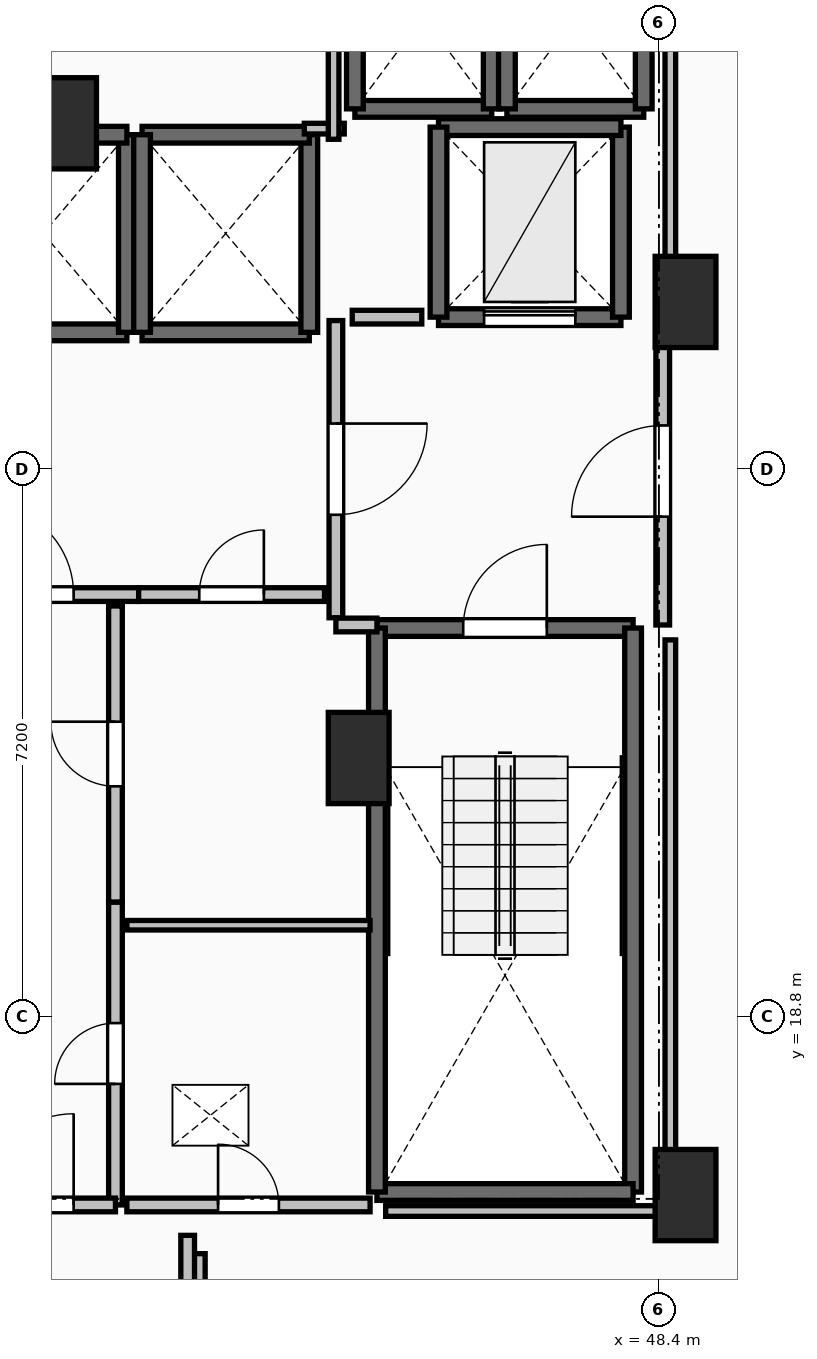
"""IFC4 building model, lengths in metres.
Left out: names, types, materials, properties, quantities, classifications, styles, units other than length and angle.
Written with IfcOpenShell. Run it as: python <this file> out.ifc"""

import sys

from ifc_helpers import new_model, si_unit, direction, frame, frame_2d, origin, origin_2d, place, context, subcontext, project, spatial, rectangle, extrude, element, fill, save


model = new_model("IFC4")
c1 = context("Model", 3, precision=1e-05, world=origin(), true_north=direction((0.0, 1.0)))
c2 = subcontext(c1, "Body", "Model", "MODEL_VIEW")
j1 = project(units=[si_unit("LENGTHUNIT", "METRE"), si_unit("PLANEANGLEUNIT", "RADIAN")], contexts=[c1])
p1 = place(None, origin())
s1 = spatial("IfcSite", under=j1, at=p1, CompositionType="ELEMENT")
p2 = place(p1, origin())
s2 = spatial("IfcBuilding", under=s1, at=p2, CompositionType="ELEMENT")
p3 = place(p2, frame((0.0, 0.0, 52.0)))
s3 = spatial("IfcBuildingStorey", under=s2, at=p3, CompositionType="ELEMENT", Elevation=52.0)
for number, where, z_axis, x_axis in (
    (1, (48.75, 28.2, 0.0), (0.0, 0.0, 1.0), (1.0, 0.0, 0.0)),
    (2, (48.75, 16.45, 0.0), (0.0, 0.0, 1.0), (1.0, 0.0, 0.0)),
    (3, (44.45, 22.2, 0.0), (0.0, 0.0, 1.0), (1.0, 0.0, 0.0)),
    (4, (40.6, 30.55, 0.0), (0.0, 0.0, 1.0), (1.0, 0.0, 0.0)),
):
    element("IfcColumn", number, at=place(p3, frame(where, z_axis=z_axis, x_axis=x_axis)), inside=s3, PredefinedType="PILASTER", context=c2, shape_type="SweptSolid", body=[
        extrude(rectangle(XDim=0.8, YDim=1.2, at=origin_2d()), origin(), (0.0, 0.0, 1.0), 3.5),
    ])
p4 = place(p3, frame((44.69, 23.91, 0.0), z_axis=(0.0, 0.0, 1.0), x_axis=(1.0, 0.0, 0.0)))
e5 = element("IfcWall", 5, at=p4, inside=s3, PredefinedType="SOLIDWALL", context=c2, shape_type="SweptSolid", body=[
    extrude(rectangle(XDim=3.37, YDim=0.22, at=frame_2d((1.685, 0.0))), origin(), (0.0, 0.0, 1.0), 3.24),
])
p5 = place(p4, frame((1.135, 0.0, 0.0)))
e6 = element("IfcOpeningElement", 6, at=p5, cuts=e5, PredefinedType="OPENING", context=c2, shape_type="SweptSolid", body=[
    extrude(rectangle(XDim=1.1, YDim=2.15, at=frame_2d((0.55, 1.075))), frame((0.0, 0.125, 0.0), z_axis=(0.0, -1.0, 0.0), x_axis=(1.0, 0.0, 0.0)), (0.0, 0.0, 1.0), 0.25),
])
p6 = place(p3, frame((48.06, 23.91, 0.0), z_axis=(0.0, 0.0, 1.0), x_axis=(0.0, -1.0, 0.0)))
e7 = element("IfcWall", 7, at=p6, inside=s3, PredefinedType="SOLIDWALL", context=c2, shape_type="SweptSolid", body=[
    extrude(rectangle(XDim=7.42, YDim=0.22, at=frame_2d((3.71, 0.0))), origin(), (0.0, 0.0, 1.0), 3.24),
])
p7 = place(p3, frame((48.06, 16.49, 0.0), z_axis=(0.0, 0.0, 1.0), x_axis=(-1.0, 0.0, 0.0)))
e8 = element("IfcWall", 8, at=p7, inside=s3, PredefinedType="SOLIDWALL", context=c2, shape_type="SweptSolid", body=[
    extrude(rectangle(XDim=3.37, YDim=0.22, at=frame_2d((1.685, 0.0))), origin(), (0.0, 0.0, 1.0), 3.24),
])
p8 = place(p3, frame((44.69, 16.49, 0.0), z_axis=(0.0, 0.0, 1.0), x_axis=(0.0, 1.0, 0.0)))
e9 = element("IfcWall", 9, at=p8, inside=s3, PredefinedType="SOLIDWALL", context=c2, shape_type="SweptSolid", body=[
    extrude(rectangle(XDim=7.42, YDim=0.22, at=frame_2d((3.71, 0.0))), origin(), (0.0, 0.0, 1.0), 3.24),
])
p9 = place(p3, frame((39.2, 27.8, 0.0), z_axis=(0.0, 0.0, 1.0), x_axis=(1.0, 0.0, 0.0)))
e10 = element("IfcWall", 10, at=p9, inside=s3, PredefinedType="SOLIDWALL", context=c2, shape_type="SweptSolid", body=[
    extrude(rectangle(XDim=2.2, YDim=0.22, at=frame_2d((1.1, 0.0))), origin(), (0.0, 0.0, 1.0), 3.24),
])
p10 = place(p3, frame((41.4, 27.8, 0.0), z_axis=(0.0, 0.0, 1.0), x_axis=(0.0, 1.0, 0.0)))
e11 = element("IfcWall", 11, at=p10, inside=s3, PredefinedType="SOLIDWALL", context=c2, shape_type="SweptSolid", body=[
    extrude(rectangle(XDim=2.6, YDim=0.22, at=frame_2d((1.3, 0.0))), origin(), (0.0, 0.0, 1.0), 3.24),
])
for number, where, z_axis, x_axis in (
    (12, (41.4, 30.4, 0.0), (0.0, 0.0, 1.0), (-1.0, 0.0, 0.0)),
    (13, (41.6, 27.8, 0.0), (0.0, 0.0, 1.0), (1.0, 0.0, 0.0)),
):
    element("IfcWall", number, at=place(p3, frame(where, z_axis=z_axis, x_axis=x_axis)), inside=s3, PredefinedType="SOLIDWALL", context=c2, shape_type="SweptSolid", body=[
        extrude(rectangle(XDim=2.2, YDim=0.22, at=frame_2d((1.1, 0.0))), origin(), (0.0, 0.0, 1.0), 3.24),
    ])
p11 = place(p3, frame((43.8, 27.8, 0.0), z_axis=(0.0, 0.0, 1.0), x_axis=(0.0, 1.0, 0.0)))
e14 = element("IfcWall", 14, at=p11, inside=s3, PredefinedType="SOLIDWALL", context=c2, shape_type="SweptSolid", body=[
    extrude(rectangle(XDim=2.6, YDim=0.22, at=frame_2d((1.3, 0.0))), origin(), (0.0, 0.0, 1.0), 3.24),
])
p12 = place(p3, frame((43.8, 30.4, 0.0), z_axis=(0.0, 0.0, 1.0), x_axis=(-1.0, 0.0, 0.0)))
e15 = element("IfcWall", 15, at=p12, inside=s3, PredefinedType="SOLIDWALL", context=c2, shape_type="SweptSolid", body=[
    extrude(rectangle(XDim=2.2, YDim=0.22, at=frame_2d((1.1, 0.0))), origin(), (0.0, 0.0, 1.0), 3.24),
])
p13 = place(p3, frame((41.6, 30.4, 0.0), z_axis=(0.0, 0.0, 1.0), x_axis=(0.0, -1.0, 0.0)))
e16 = element("IfcWall", 16, at=p13, inside=s3, PredefinedType="SOLIDWALL", context=c2, shape_type="SweptSolid", body=[
    extrude(rectangle(XDim=2.6, YDim=0.22, at=frame_2d((1.3, 0.0))), origin(), (0.0, 0.0, 1.0), 3.24),
])
p14 = place(p3, frame((44.4, 30.74, 0.0), z_axis=(0.0, 0.0, 1.0), x_axis=(1.0, 0.0, 0.0)))
e17 = element("IfcWall", 17, at=p14, inside=s3, PredefinedType="SOLIDWALL", context=c2, shape_type="SweptSolid", body=[
    extrude(rectangle(XDim=1.8, YDim=0.22, at=frame_2d((0.9, 0.0))), origin(), (0.0, 0.0, 1.0), 3.24),
])
for number, where, z_axis, x_axis in (
    (18, (46.2, 30.74, 0.0), (0.0, 0.0, 1.0), (0.0, 1.0, 0.0)),
    (19, (44.4, 33.16, 0.0), (0.0, 0.0, 1.0), (0.0, -1.0, 0.0)),
):
    element("IfcWall", number, at=place(p3, frame(where, z_axis=z_axis, x_axis=x_axis)), inside=s3, PredefinedType="SOLIDWALL", context=c2, shape_type="SweptSolid", body=[
        extrude(rectangle(XDim=2.42, YDim=0.22, at=frame_2d((1.21, 0.0))), origin(), (0.0, 0.0, 1.0), 3.24),
    ])
p15 = place(p3, frame((46.4, 30.74, 0.0), z_axis=(0.0, 0.0, 1.0), x_axis=(1.0, 0.0, 0.0)))
e20 = element("IfcWall", 20, at=p15, inside=s3, PredefinedType="SOLIDWALL", context=c2, shape_type="SweptSolid", body=[
    extrude(rectangle(XDim=1.8, YDim=0.22, at=frame_2d((0.9, 0.0))), origin(), (0.0, 0.0, 1.0), 3.24),
])
for number, where, z_axis, x_axis in (
    (21, (48.2, 30.74, 0.0), (0.0, 0.0, 1.0), (0.0, 1.0, 0.0)),
    (22, (46.4, 33.16, 0.0), (0.0, 0.0, 1.0), (0.0, -1.0, 0.0)),
):
    element("IfcWall", number, at=place(p3, frame(where, z_axis=z_axis, x_axis=x_axis)), inside=s3, PredefinedType="SOLIDWALL", context=c2, shape_type="SweptSolid", body=[
        extrude(rectangle(XDim=2.42, YDim=0.22, at=frame_2d((1.21, 0.0))), origin(), (0.0, 0.0, 1.0), 3.24),
    ])
p16 = place(p3, frame((45.5, 28.0, 0.0), z_axis=(0.0, 0.0, 1.0), x_axis=(1.0, 0.0, 0.0)))
e23 = element("IfcWall", 23, at=p16, inside=s3, PredefinedType="SHEAR", context=c2, shape_type="SweptSolid", body=[
    extrude(rectangle(XDim=2.4, YDim=0.22, at=frame_2d((1.2, 0.0))), origin(), (0.0, 0.0, 1.0), 3.24),
])
p17 = place(p16, frame((0.6, 0.0, 0.0)))
e24 = element("IfcOpeningElement", 24, at=p17, cuts=e23, PredefinedType="OPENING", context=c2, shape_type="SweptSolid", body=[
    extrude(rectangle(XDim=1.2, YDim=2.2, at=frame_2d((0.6, 1.1))), frame((0.0, 0.125, 0.0), z_axis=(0.0, -1.0, 0.0), x_axis=(1.0, 0.0, 0.0)), (0.0, 0.0, 1.0), 0.25),
])
p18 = place(p3, frame((47.9, 28.0, 0.0), z_axis=(0.0, 0.0, 1.0), x_axis=(0.0, 1.0, 0.0)))
e25 = element("IfcWall", 25, at=p18, inside=s3, PredefinedType="SHEAR", context=c2, shape_type="SweptSolid", body=[
    extrude(rectangle(XDim=2.5, YDim=0.22, at=frame_2d((1.25, 0.0))), origin(), (0.0, 0.0, 1.0), 3.24),
])
p19 = place(p3, frame((47.9, 30.5, 0.0), z_axis=(0.0, 0.0, 1.0), x_axis=(-1.0, 0.0, 0.0)))
e26 = element("IfcWall", 26, at=p19, inside=s3, PredefinedType="SHEAR", context=c2, shape_type="SweptSolid", body=[
    extrude(rectangle(XDim=2.4, YDim=0.22, at=frame_2d((1.2, 0.0))), origin(), (0.0, 0.0, 1.0), 3.24),
])
p20 = place(p3, frame((45.5, 30.5, 0.0), z_axis=(0.0, 0.0, 1.0), x_axis=(0.0, -1.0, 0.0)))
e27 = element("IfcWall", 27, at=p20, inside=s3, PredefinedType="SHEAR", context=c2, shape_type="SweptSolid", body=[
    extrude(rectangle(XDim=2.5, YDim=0.22, at=frame_2d((1.25, 0.0))), origin(), (0.0, 0.0, 1.0), 3.24),
])
p21 = place(p3, frame((44.15, 27.955, 0.0), z_axis=(0.0, 0.0, 1.0), x_axis=(0.0, -1.0, 0.0)))
e28 = element("IfcWall", 28, at=p21, inside=s3, PredefinedType="PARTITIONING", context=c2, shape_type="SweptSolid", body=[
    extrude(rectangle(XDim=3.91, YDim=0.18, at=frame_2d((1.955, 0.0))), origin(), (0.0, 0.0, 1.0), 3.24),
])
p22 = place(p21, frame((1.355, 0.0, 0.0)))
e29 = element("IfcOpeningElement", 29, at=p22, cuts=e28, PredefinedType="OPENING", context=c2, shape_type="SweptSolid", body=[
    extrude(rectangle(XDim=1.2, YDim=2.15, at=frame_2d((0.6, 1.075))), frame((0.0, 0.105, 0.0), z_axis=(0.0, -1.0, 0.0), x_axis=(1.0, 0.0, 0.0)), (0.0, 0.0, 1.0), 0.21),
])
p23 = place(p3, frame((44.15, 23.95, 0.0), z_axis=(0.0, 0.0, 1.0), x_axis=(1.0, 0.0, 0.0)))
e30 = element("IfcWall", 30, at=p23, inside=s3, PredefinedType="PARTITIONING", context=c2, shape_type="SweptSolid", body=[
    extrude(rectangle(XDim=0.54, YDim=0.18, at=frame_2d((0.27, 0.0))), origin(), (0.0, 0.0, 1.0), 3.24),
])
p24 = place(p3, frame((48.45, 23.95, 0.0), z_axis=(0.0, 0.0, 1.0), x_axis=(0.0, 1.0, 0.0)))
e31 = element("IfcWall", 31, at=p24, inside=s3, PredefinedType="PARTITIONING", context=c2, shape_type="SweptSolid", body=[
    extrude(rectangle(XDim=4.05, YDim=0.18, at=frame_2d((2.025, 0.0))), origin(), (0.0, 0.0, 1.0), 3.24),
])
p25 = place(p24, frame((1.425, 0.0, 0.0)))
e32 = element("IfcOpeningElement", 32, at=p25, cuts=e31, PredefinedType="OPENING", context=c2, shape_type="SweptSolid", body=[
    extrude(rectangle(XDim=1.2, YDim=2.15, at=frame_2d((0.6, 1.075))), frame((0.0, 0.105, 0.0), z_axis=(0.0, -1.0, 0.0), x_axis=(1.0, 0.0, 0.0)), (0.0, 0.0, 1.0), 0.21),
])
p26 = place(p3, frame((38.645, 24.35, 0.0), z_axis=(0.0, 0.0, 1.0), x_axis=(1.0, 0.0, 0.0)))
e33 = element("IfcWall", 33, at=p26, inside=s3, PredefinedType="PARTITIONING", context=c2, shape_type="SweptSolid", body=[
    extrude(rectangle(XDim=2.91, YDim=0.18, at=frame_2d((1.455, 0.0))), origin(), (0.0, 0.0, 1.0), 3.24),
])
p27 = place(p26, frame((0.855, 0.0, 0.0)))
e34 = element("IfcOpeningElement", 34, at=p27, cuts=e33, PredefinedType="OPENING", context=c2, shape_type="SweptSolid", body=[
    extrude(rectangle(XDim=1.2, YDim=2.15, at=frame_2d((0.6, 1.075))), frame((0.0, 0.105, 0.0), z_axis=(0.0, -1.0, 0.0), x_axis=(1.0, 0.0, 0.0)), (0.0, 0.0, 1.0), 0.21),
])
p28 = place(p3, frame((41.555, 24.35, 0.0), z_axis=(0.0, 0.0, 1.0), x_axis=(1.0, 0.0, 0.0)))
e35 = element("IfcWall", 35, at=p28, inside=s3, PredefinedType="PARTITIONING", context=c2, shape_type="SweptSolid", body=[
    extrude(rectangle(XDim=2.445, YDim=0.18, at=frame_2d((1.223, 0.0))), origin(), (0.0, 0.0, 1.0), 3.24),
])
p29 = place(p28, frame((0.798, 0.0, 0.0)))
e36 = element("IfcOpeningElement", 36, at=p29, cuts=e35, PredefinedType="OPENING", context=c2, shape_type="SweptSolid", body=[
    extrude(rectangle(XDim=0.85, YDim=2.1, at=frame_2d((0.425, 1.05))), frame((0.0, 0.105, 0.0), z_axis=(0.0, -1.0, 0.0), x_axis=(1.0, 0.0, 0.0)), (0.0, 0.0, 1.0), 0.21),
])
p30 = place(p3, frame((41.25, 16.32, 0.0), z_axis=(0.0, 0.0, 1.0), x_axis=(0.0, 1.0, 0.0)))
e37 = element("IfcWall", 37, at=p30, inside=s3, PredefinedType="PARTITIONING", context=c2, shape_type="SweptSolid", body=[
    extrude(rectangle(XDim=3.985, YDim=0.18, at=frame_2d((1.992, 0.0))), origin(), (0.0, 0.0, 1.0), 3.24),
])
p31 = place(p30, frame((1.593, 0.0, 0.0)))
e38 = element("IfcOpeningElement", 38, at=p31, cuts=e37, PredefinedType="OPENING", context=c2, shape_type="SweptSolid", body=[
    extrude(rectangle(XDim=0.8, YDim=2.05, at=frame_2d((0.4, 1.025))), frame((0.0, 0.105, 0.0), z_axis=(0.0, -1.0, 0.0), x_axis=(1.0, 0.0, 0.0)), (0.0, 0.0, 1.0), 0.21),
])
p32 = place(p3, frame((41.25, 20.305, 0.0), z_axis=(0.0, 0.0, 1.0), x_axis=(0.0, 1.0, 0.0)))
e39 = element("IfcWall", 39, at=p32, inside=s3, PredefinedType="PARTITIONING", context=c2, shape_type="SweptSolid", body=[
    extrude(rectangle(XDim=3.895, YDim=0.18, at=frame_2d((1.948, 0.0))), origin(), (0.0, 0.0, 1.0), 3.24),
])
p33 = place(p32, frame((1.522, 0.0, 0.0)))
e40 = element("IfcOpeningElement", 40, at=p33, cuts=e39, PredefinedType="OPENING", context=c2, shape_type="SweptSolid", body=[
    extrude(rectangle(XDim=0.85, YDim=2.1, at=frame_2d((0.425, 1.05))), frame((0.0, 0.105, 0.0), z_axis=(0.0, -1.0, 0.0), x_axis=(1.0, 0.0, 0.0)), (0.0, 0.0, 1.0), 0.21),
])
p34 = place(p3, frame((38.95, 16.32, 0.0), z_axis=(0.0, 0.0, 1.0), x_axis=(1.0, 0.0, 0.0)))
e41 = element("IfcWall", 41, at=p34, inside=s3, PredefinedType="PARTITIONING", context=c2, shape_type="SweptSolid", body=[
    extrude(rectangle(XDim=2.3, YDim=0.18, at=frame_2d((1.15, 0.0))), origin(), (0.0, 0.0, 1.0), 3.24),
])
p35 = place(p34, frame((0.55, 0.0, 0.0)))
e42 = element("IfcOpeningElement", 42, at=p35, cuts=e41, PredefinedType="OPENING", context=c2, shape_type="SweptSolid", body=[
    extrude(rectangle(XDim=1.2, YDim=2.15, at=frame_2d((0.6, 1.075))), frame((0.0, 0.105, 0.0), z_axis=(0.0, -1.0, 0.0), x_axis=(1.0, 0.0, 0.0)), (0.0, 0.0, 1.0), 0.21),
])
p36 = place(p3, frame((44.6, 20.0, 0.0), z_axis=(0.0, 0.0, 1.0), x_axis=(-1.0, 0.0, 0.0)))
e43 = element("IfcWall", 43, at=p36, inside=s3, PredefinedType="PARTITIONING", context=c2, shape_type="SweptSolid", body=[
    extrude(rectangle(XDim=3.2, YDim=0.125, at=frame_2d((1.6, 0.0))), origin(), (0.0, 0.0, 1.0), 3.24),
])
p37 = place(p3, frame((41.4, 16.32, 0.0), z_axis=(0.0, 0.0, 1.0), x_axis=(1.0, 0.0, 0.0)))
e44 = element("IfcWall", 44, at=p37, inside=s3, PredefinedType="PARTITIONING", context=c2, shape_type="SweptSolid", body=[
    extrude(rectangle(XDim=3.2, YDim=0.18, at=frame_2d((1.6, 0.0))), origin(), (0.0, 0.0, 1.0), 3.24),
])
p38 = place(p37, frame((1.2, 0.0, 0.0)))
e45 = element("IfcOpeningElement", 45, at=p38, cuts=e44, PredefinedType="OPENING", context=c2, shape_type="SweptSolid", body=[
    extrude(rectangle(XDim=0.8, YDim=2.05, at=frame_2d((0.4, 1.025))), frame((0.0, 0.105, 0.0), z_axis=(0.0, -1.0, 0.0), x_axis=(1.0, 0.0, 0.0)), (0.0, 0.0, 1.0), 0.21),
])
p39 = place(p3, frame((42.34, 15.679, 0.0), z_axis=(0.0, 0.0, 1.0), x_axis=(0.0, -1.0, 0.0)))
e46 = element("IfcWall", 46, at=p39, inside=s3, PredefinedType="PARTITIONING", context=c2, shape_type="SweptSolid", body=[
    extrude(rectangle(XDim=1.579, YDim=0.18, at=frame_2d((0.79, 0.0))), origin(), (0.0, 0.0, 1.0), 3.24),
])
p40 = place(p3, frame((42.2, 14.1, 0.0), z_axis=(0.0, 0.0, 1.0), x_axis=(0.0, 1.0, 0.0)))
e47 = element("IfcWall", 47, at=p40, inside=s3, PredefinedType="PARTITIONING", context=c2, shape_type="SweptSolid", body=[
    extrude(rectangle(XDim=1.82, YDim=0.18, at=frame_2d((0.91, 0.0))), origin(), (0.0, 0.0, 1.0), 3.24),
])
p41 = place(p3, frame((45.28, 28.0, 0.0), z_axis=(0.0, 0.0, 1.0), x_axis=(-1.0, 0.0, 0.0)))
e48 = element("IfcWall", 48, at=p41, inside=s3, PredefinedType="PARTITIONING", context=c2, shape_type="SweptSolid", body=[
    extrude(rectangle(XDim=0.915, YDim=0.18, at=frame_2d((0.458, 0.0))), origin(), (0.0, 0.0, 1.0), 3.24),
])
p42 = place(p3, frame((43.735, 30.48, 0.0), z_axis=(0.0, 0.0, 1.0), x_axis=(1.0, 0.0, 0.0)))
e49 = element("IfcWall", 49, at=p42, inside=s3, PredefinedType="PARTITIONING", context=c2, shape_type="SweptSolid", body=[
    extrude(rectangle(XDim=0.525, YDim=0.14, at=frame_2d((0.262, 0.0))), origin(), (0.0, 0.0, 1.0), 3.24),
])
p43 = place(p3, frame((44.12, 30.34, 0.0), z_axis=(0.0, 0.0, 1.0), x_axis=(0.0, 1.0, 0.0)))
e50 = element("IfcWall", 50, at=p43, inside=s3, PredefinedType="PARTITIONING", context=c2, shape_type="SweptSolid", body=[
    extrude(rectangle(XDim=2.66, YDim=0.14, at=frame_2d((1.33, 0.0))), origin(), (0.0, 0.0, 1.0), 3.24),
])
p44 = place(p3, frame((48.55, 33.45, 0.0), z_axis=(0.0, 0.0, 1.0), x_axis=(0.0, -1.0, 0.0)))
e51 = element("IfcWall", 51, at=p44, inside=s3, PredefinedType="PARTITIONING", context=c2, shape_type="SweptSolid", body=[
    extrude(rectangle(XDim=5.254, YDim=0.14, at=frame_2d((2.627, 0.0))), origin(), (0.0, 0.0, 1.0), 2.432),
])
p45 = place(p3, frame((48.55, 23.754, 0.0), z_axis=(0.0, 0.0, 1.0), x_axis=(0.0, -1.0, 0.0)))
e52 = element("IfcWall", 52, at=p45, inside=s3, PredefinedType="PARTITIONING", context=c2, shape_type="SweptSolid", body=[
    extrude(rectangle(XDim=7.514, YDim=0.14, at=frame_2d((3.757, 0.0))), origin(), (0.0, 0.0, 1.0), 2.432),
])
p46 = place(p3, frame((48.55, 16.24, 0.0), z_axis=(0.0, 0.0, 1.0), x_axis=(-1.0, 0.0, 0.0)))
e53 = element("IfcWall", 53, at=p46, inside=s3, PredefinedType="PARTITIONING", context=c2, shape_type="SweptSolid", body=[
    extrude(rectangle(XDim=3.745, YDim=0.14, at=frame_2d((1.873, 0.0))), origin(), (0.0, 0.0, 1.0), 2.432),
])
p47 = place(p5, origin())
e54 = element("IfcDoor", 54, at=p47, inside=s3, OperationType="SINGLE_SWING_RIGHT", PredefinedType="DOOR", context=c2, shape_type="SweptSolid", body=[
    extrude(rectangle(XDim=1.1, YDim=2.15, at=frame_2d((0.55, 1.075))), frame((0.0, 0.025, 0.0), z_axis=(0.0, -1.0, 0.0), x_axis=(1.0, 0.0, 0.0)), (0.0, 0.0, 1.0), 0.05),
])
fill(e6, e54)
p48 = place(p17, origin())
e55 = element("IfcDoor", 55, at=p48, inside=s3, OperationType="SLIDING_TO_LEFT", PredefinedType="DOOR", context=c2, shape_type="SweptSolid", body=[
    extrude(rectangle(XDim=1.2, YDim=2.2, at=frame_2d((0.6, 1.1))), frame((0.0, 0.025, 0.0), z_axis=(0.0, -1.0, 0.0), x_axis=(1.0, 0.0, 0.0)), (0.0, 0.0, 1.0), 0.05),
])
fill(e24, e55)
p49 = place(p22, origin())
e56 = element("IfcDoor", 56, at=p49, inside=s3, OperationType="SINGLE_SWING_LEFT", PredefinedType="DOOR", context=c2, shape_type="SweptSolid", body=[
    extrude(rectangle(XDim=1.2, YDim=2.15, at=frame_2d((0.6, 1.075))), frame((0.0, 0.025, 0.0), z_axis=(0.0, -1.0, 0.0), x_axis=(1.0, 0.0, 0.0)), (0.0, 0.0, 1.0), 0.05),
])
fill(e29, e56)
p50 = place(p25, origin())
e57 = element("IfcDoor", 57, at=p50, inside=s3, OperationType="SINGLE_SWING_LEFT", PredefinedType="DOOR", context=c2, shape_type="SweptSolid", body=[
    extrude(rectangle(XDim=1.2, YDim=2.15, at=frame_2d((0.6, 1.075))), frame((0.0, 0.025, 0.0), z_axis=(0.0, -1.0, 0.0), x_axis=(1.0, 0.0, 0.0)), (0.0, 0.0, 1.0), 0.05),
])
fill(e32, e57)
p51 = place(p27, origin())
e58 = element("IfcDoor", 58, at=p51, inside=s3, OperationType="SINGLE_SWING_LEFT", PredefinedType="DOOR", context=c2, shape_type="SweptSolid", body=[
    extrude(rectangle(XDim=1.2, YDim=2.15, at=frame_2d((0.6, 1.075))), frame((0.0, 0.025, 0.0), z_axis=(0.0, -1.0, 0.0), x_axis=(1.0, 0.0, 0.0)), (0.0, 0.0, 1.0), 0.05),
])
fill(e34, e58)
p52 = place(p29, origin())
e59 = element("IfcDoor", 59, at=p52, inside=s3, OperationType="SINGLE_SWING_RIGHT", PredefinedType="DOOR", context=c2, shape_type="SweptSolid", body=[
    extrude(rectangle(XDim=0.85, YDim=2.1, at=frame_2d((0.425, 1.05))), frame((0.0, 0.025, 0.0), z_axis=(0.0, -1.0, 0.0), x_axis=(1.0, 0.0, 0.0)), (0.0, 0.0, 1.0), 0.05),
])
fill(e36, e59)
p53 = place(p31, origin())
e60 = element("IfcDoor", 60, at=p53, inside=s3, OperationType="SINGLE_SWING_LEFT", PredefinedType="DOOR", context=c2, shape_type="SweptSolid", body=[
    extrude(rectangle(XDim=0.8, YDim=2.05, at=frame_2d((0.4, 1.025))), frame((0.0, 0.025, 0.0), z_axis=(0.0, -1.0, 0.0), x_axis=(1.0, 0.0, 0.0)), (0.0, 0.0, 1.0), 0.05),
])
fill(e38, e60)
p54 = place(p33, origin())
e61 = element("IfcDoor", 61, at=p54, inside=s3, OperationType="SINGLE_SWING_RIGHT", PredefinedType="DOOR", context=c2, shape_type="SweptSolid", body=[
    extrude(rectangle(XDim=0.85, YDim=2.1, at=frame_2d((0.425, 1.05))), frame((0.0, 0.025, 0.0), z_axis=(0.0, -1.0, 0.0), x_axis=(1.0, 0.0, 0.0)), (0.0, 0.0, 1.0), 0.05),
])
fill(e40, e61)
p55 = place(p35, origin())
e62 = element("IfcDoor", 62, at=p55, inside=s3, OperationType="SINGLE_SWING_RIGHT", PredefinedType="DOOR", context=c2, shape_type="SweptSolid", body=[
    extrude(rectangle(XDim=1.2, YDim=2.15, at=frame_2d((0.6, 1.075))), frame((0.0, 0.025, 0.0), z_axis=(0.0, -1.0, 0.0), x_axis=(1.0, 0.0, 0.0)), (0.0, 0.0, 1.0), 0.05),
])
fill(e42, e62)
p56 = place(p38, origin())
e63 = element("IfcDoor", 63, at=p56, inside=s3, OperationType="SINGLE_SWING_LEFT", PredefinedType="DOOR", context=c2, shape_type="SweptSolid", body=[
    extrude(rectangle(XDim=0.8, YDim=2.05, at=frame_2d((0.4, 1.025))), frame((0.0, 0.025, 0.0), z_axis=(0.0, -1.0, 0.0), x_axis=(1.0, 0.0, 0.0)), (0.0, 0.0, 1.0), 0.05),
])
fill(e45, e63)
save(model, sys.argv[1])
